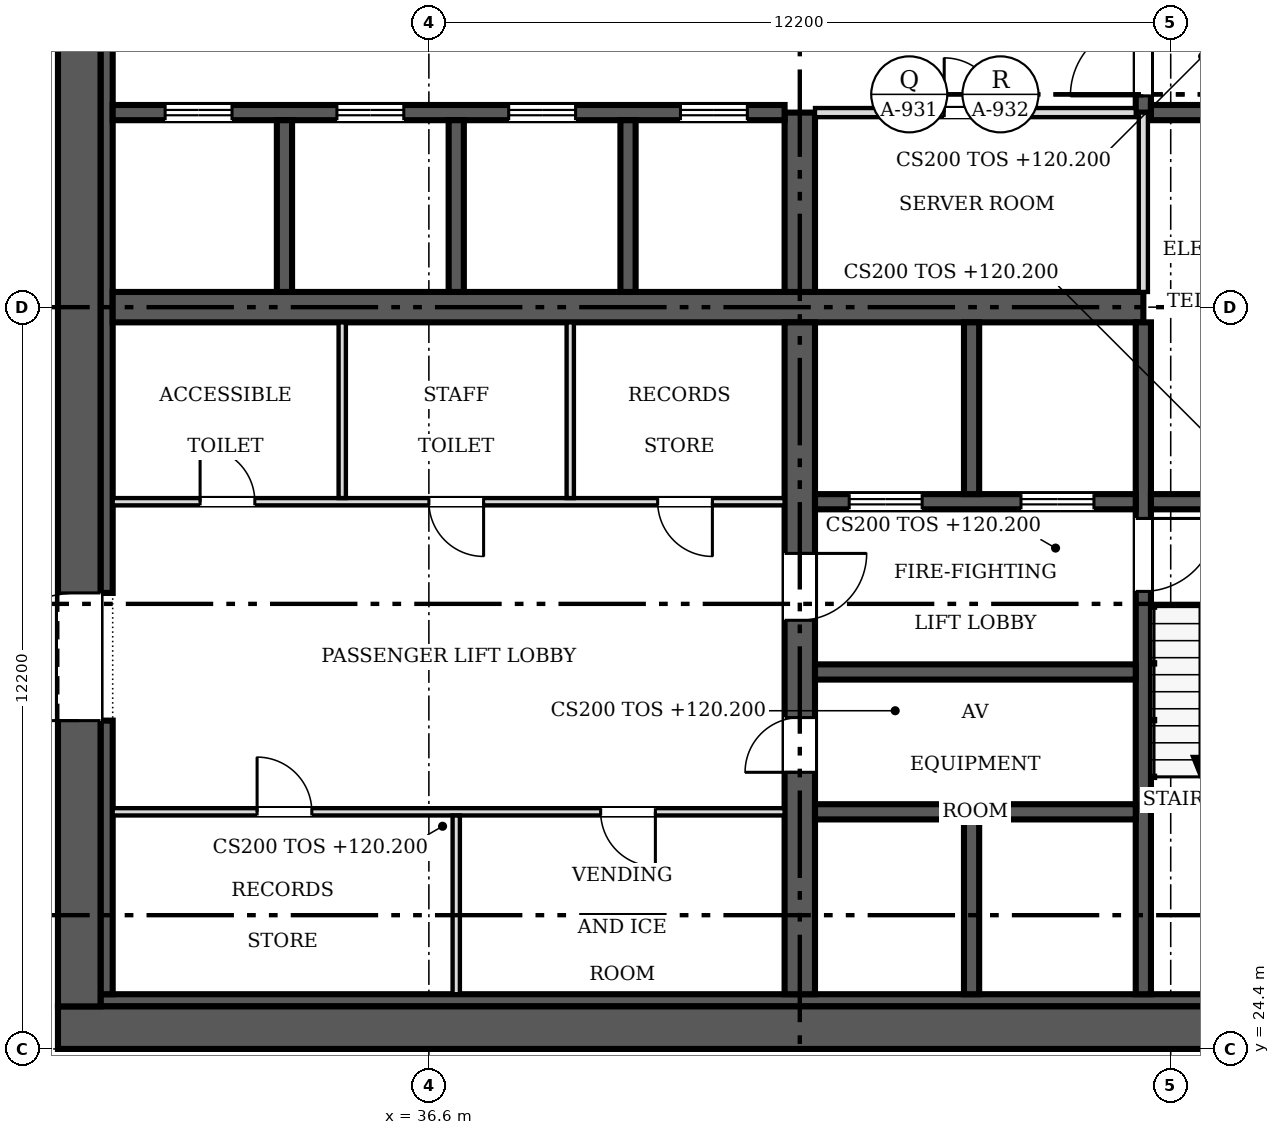
"""IFC4 building model, lengths in metres.
Left out: names, types, materials, properties, quantities, classifications, styles, units other than length and angle.
Written with IfcOpenShell. Run it as: python <this file> out.ifc"""

import sys

from ifc_helpers import new_model, si_unit, direction, frame, frame_2d, origin, place, context, subcontext, project, spatial, rectangle, extrude, source, transform, mapped, element, fill, save


model = new_model("IFC4")
c1 = context("Model", 3, precision=1e-05, world=origin(), true_north=direction((0.0, 1.0)))
c2 = subcontext(c1, "Body", "Model", "MODEL_VIEW")
j1 = project(units=[si_unit("LENGTHUNIT", "METRE"), si_unit("PLANEANGLEUNIT", "RADIAN")], contexts=[c1])
p1 = place(None, origin())
s1 = spatial("IfcSite", under=j1, at=p1, CompositionType="ELEMENT")
p2 = place(p1, origin())
s2 = spatial("IfcBuilding", under=s1, at=p2, CompositionType="ELEMENT")
p3 = place(p2, frame((0.0, 0.0, 120.2)))
s3 = spatial("IfcBuildingStorey", under=s2, at=p3, CompositionType="ELEMENT", Elevation=120.2)
p4 = place(p3, frame((54.9, 24.75, 0.0), z_axis=(0.0, 0.0, 1.0), x_axis=(-1.0, 0.0, 0.0)))
e1 = element("IfcWall", 1, at=p4, inside=s3, PredefinedType="SHEAR", context=c2, shape_type="SweptSolid", body=[
    extrude(rectangle(XDim=24.4, YDim=0.7, at=frame_2d((12.2, 0.0))), origin(), (0.0, 0.0, 1.0), 3.8),
])
m1 = source(origin(), c2, "Body", "SweptSolid", [
    extrude(rectangle(XDim=1.2, YDim=2.1, at=frame_2d((0.6, 1.05))), frame((0.0, 0.36, 0.0), z_axis=(0.0, -1.0, 0.0), x_axis=(1.0, 0.0, 0.0)), (0.0, 0.0, 1.0), 0.72),
])
p5 = place(p4, frame((1.5, 0.0, 0.0)))
e2 = element("IfcOpeningElement", 2, at=p5, cuts=e1, PredefinedType="OPENING", context=c2, shape_type="MappedRepresentation", body=[
    mapped(m1, transform((0.0, 0.0, 0.0), scale=1.0)),
])
p6 = place(p3, frame((30.85, 25.1, 0.0), z_axis=(0.0, 0.0, 1.0), x_axis=(0.0, 1.0, 0.0)))
e3 = element("IfcWall", 3, at=p6, inside=s3, PredefinedType="SHEAR", context=c2, shape_type="SweptSolid", body=[
    extrude(rectangle(XDim=23.0, YDim=0.7, at=frame_2d((11.5, 0.0))), origin(), (0.0, 0.0, 1.0), 3.8),
])
m2 = source(origin(), c2, "Body", "SweptSolid", [
    extrude(rectangle(XDim=2.1, YDim=2.4, at=frame_2d((1.05, 1.2))), frame((0.0, 0.36, 0.0), z_axis=(0.0, -1.0, 0.0), x_axis=(1.0, 0.0, 0.0)), (0.0, 0.0, 1.0), 0.72),
])
p7 = place(p6, frame((4.7, 0.0, 0.0)))
e4 = element("IfcOpeningElement", 4, at=p7, cuts=e3, PredefinedType="OPENING", context=c2, shape_type="MappedRepresentation", body=[
    mapped(m2, transform((0.0, 0.0, 0.0), scale=1.0)),
])
p8 = place(p6, frame((16.2, 0.0, 0.0)))
e5 = element("IfcOpeningElement", 5, at=p8, cuts=e3, PredefinedType="OPENING", context=c2, shape_type="MappedRepresentation", body=[
    mapped(m2, transform((0.0, 0.0, 0.0), scale=1.0)),
])
p9 = place(p3, frame((31.2, 25.2, 0.0), z_axis=(0.0, 0.0, 1.0), x_axis=(1.0, 0.0, 0.0)))
e6 = element("IfcWall", 6, at=p9, inside=s3, PredefinedType="SOLIDWALL", context=c2, shape_type="SweptSolid", body=[
    extrude(rectangle(XDim=21.0, YDim=0.2, at=frame_2d((10.5, 0.0))), origin(), (0.0, 0.0, 1.0), 3.8),
])
p10 = place(p3, frame((31.3, 25.3, 0.0), z_axis=(0.0, 0.0, 1.0), x_axis=(0.0, 1.0, 0.0)))
e7 = element("IfcWall", 7, at=p10, inside=s3, PredefinedType="SOLIDWALL", context=c2, shape_type="SweptSolid", body=[
    extrude(rectangle(XDim=4.5, YDim=0.2, at=frame_2d((2.25, 0.0))), origin(), (0.0, 0.0, 1.0), 3.8),
])
p11 = place(p3, frame((31.3, 31.9, 0.0), z_axis=(0.0, 0.0, 1.0), x_axis=(0.0, 1.0, 0.0)))
e8 = element("IfcWall", 8, at=p11, inside=s3, PredefinedType="SOLIDWALL", context=c2, shape_type="SweptSolid", body=[
    extrude(rectangle(XDim=9.4, YDim=0.2, at=frame_2d((4.7, 0.0))), origin(), (0.0, 0.0, 1.0), 3.8),
])
p12 = place(p3, frame((31.4, 36.6, 0.0), z_axis=(0.0, 0.0, 1.0), x_axis=(1.0, 0.0, 0.0)))
e9 = element("IfcWall", 9, at=p12, inside=s3, PredefinedType="SHEAR", context=c2, shape_type="SweptSolid", body=[
    extrude(rectangle(XDim=16.95, YDim=0.5, at=frame_2d((8.475, 0.0))), origin(), (0.0, 0.0, 1.0), 3.8),
])
p13 = place(p3, frame((42.7, 36.35, 0.0), z_axis=(0.0, 0.0, 1.0), x_axis=(0.0, -1.0, 0.0)))
e10 = element("IfcWall", 10, at=p13, inside=s3, PredefinedType="SHEAR", context=c2, shape_type="SweptSolid", body=[
    extrude(rectangle(XDim=11.05, YDim=0.5, at=frame_2d((5.525, 0.0))), origin(), (0.0, 0.0, 1.0), 3.8),
])
m3 = source(origin(), c2, "Body", "SweptSolid", [
    extrude(rectangle(XDim=0.9, YDim=2.1, at=frame_2d((0.45, 1.05))), frame((0.0, 0.26, 0.0), z_axis=(0.0, -1.0, 0.0), x_axis=(1.0, 0.0, 0.0)), (0.0, 0.0, 1.0), 0.52),
])
p14 = place(p13, frame((6.5, 0.0, 0.0)))
e11 = element("IfcOpeningElement", 11, at=p14, cuts=e10, PredefinedType="OPENING", context=c2, shape_type="MappedRepresentation", body=[
    mapped(m3, transform((0.0, 0.0, 0.0), scale=1.0)),
])
m4 = source(origin(), c2, "Body", "SweptSolid", [
    extrude(rectangle(XDim=1.1, YDim=2.1, at=frame_2d((0.55, 1.05))), frame((0.0, 0.26, 0.0), z_axis=(0.0, -1.0, 0.0), x_axis=(1.0, 0.0, 0.0)), (0.0, 0.0, 1.0), 0.52),
])
p15 = place(p13, frame((3.8, 0.0, 0.0)))
e12 = element("IfcOpeningElement", 12, at=p15, cuts=e10, PredefinedType="OPENING", context=c2, shape_type="MappedRepresentation", body=[
    mapped(m4, transform((0.0, 0.0, 0.0), scale=1.0)),
])
p16 = place(p3, frame((42.7, 36.85, 0.0), z_axis=(0.0, 0.0, 1.0), x_axis=(0.0, 1.0, 0.0)))
e13 = element("IfcWall", 13, at=p16, inside=s3, PredefinedType="SHEAR", context=c2, shape_type="SweptSolid", body=[
    extrude(rectangle(XDim=2.95, YDim=0.5, at=frame_2d((1.475, 0.0))), origin(), (0.0, 0.0, 1.0), 3.8),
])
p17 = place(p3, frame((31.4, 39.8, 0.0), z_axis=(0.0, 0.0, 1.0), x_axis=(1.0, 0.0, 0.0)))
e14 = element("IfcWall", 14, at=p17, inside=s3, PredefinedType="SOLIDWALL", context=c2, shape_type="SweptSolid", body=[
    extrude(rectangle(XDim=11.05, YDim=0.25, at=frame_2d((5.525, 0.0))), origin(), (0.0, 0.0, 1.0), 3.8),
])
m5 = source(origin(), c2, "Body", "SweptSolid", [
    extrude(rectangle(XDim=1.1, YDim=2.1, at=frame_2d((0.55, 1.05))), frame((0.0, 0.135, 0.0), z_axis=(0.0, -1.0, 0.0), x_axis=(1.0, 0.0, 0.0)), (0.0, 0.0, 1.0), 0.27),
])
p18 = place(p17, frame((0.863, 0.0, 0.0)))
e15 = element("IfcOpeningElement", 15, at=p18, cuts=e14, PredefinedType="OPENING", context=c2, shape_type="MappedRepresentation", body=[
    mapped(m5, transform((0.0, 0.0, 0.0), scale=1.0)),
])
p19 = place(p17, frame((3.688, 0.0, 0.0)))
e16 = element("IfcOpeningElement", 16, at=p19, cuts=e14, PredefinedType="OPENING", context=c2, shape_type="MappedRepresentation", body=[
    mapped(m5, transform((0.0, 0.0, 0.0), scale=1.0)),
])
p20 = place(p17, frame((6.512, 0.0, 0.0)))
e17 = element("IfcOpeningElement", 17, at=p20, cuts=e14, PredefinedType="OPENING", context=c2, shape_type="MappedRepresentation", body=[
    mapped(m5, transform((0.0, 0.0, 0.0), scale=1.0)),
])
p21 = place(p17, frame((9.337, 0.0, 0.0)))
e18 = element("IfcOpeningElement", 18, at=p21, cuts=e14, PredefinedType="OPENING", context=c2, shape_type="MappedRepresentation", body=[
    mapped(m5, transform((0.0, 0.0, 0.0), scale=1.0)),
])
p22 = place(p3, frame((48.35, 36.35, 0.0), z_axis=(0.0, 0.0, 1.0), x_axis=(0.0, -1.0, 0.0)))
e19 = element("IfcWall", 19, at=p22, inside=s3, PredefinedType="SOLIDWALL", context=c2, shape_type="SweptSolid", body=[
    extrude(rectangle(XDim=11.05, YDim=0.25, at=frame_2d((5.525, 0.0))), origin(), (0.0, 0.0, 1.0), 3.8),
])
m6 = source(origin(), c2, "Body", "SweptSolid", [
    extrude(rectangle(XDim=1.2, YDim=2.1, at=frame_2d((0.6, 1.05))), frame((0.0, 0.135, 0.0), z_axis=(0.0, -1.0, 0.0), x_axis=(1.0, 0.0, 0.0)), (0.0, 0.0, 1.0), 0.27),
])
p23 = place(p22, frame((3.225, 0.0, 0.0)))
e20 = element("IfcOpeningElement", 20, at=p23, cuts=e19, PredefinedType="OPENING", context=c2, shape_type="MappedRepresentation", body=[
    mapped(m6, transform((0.0, 0.0, 0.0), scale=1.0)),
])
p24 = place(p3, frame((48.225, 33.4, 0.0), z_axis=(0.0, 0.0, 1.0), x_axis=(-1.0, 0.0, 0.0)))
e21 = element("IfcWall", 21, at=p24, inside=s3, PredefinedType="SOLIDWALL", context=c2, shape_type="SweptSolid", body=[
    extrude(rectangle(XDim=5.275, YDim=0.25, at=frame_2d((2.638, 0.0))), origin(), (0.0, 0.0, 1.0), 3.8),
])
p25 = place(p24, frame((3.512, 0.0, 0.0)))
e22 = element("IfcOpeningElement", 22, at=p25, cuts=e21, PredefinedType="OPENING", context=c2, shape_type="MappedRepresentation", body=[
    mapped(m6, transform((0.0, 0.0, 0.0), scale=1.0)),
])
p26 = place(p24, frame((0.688, 0.0, 0.0)))
e23 = element("IfcOpeningElement", 23, at=p26, cuts=e21, PredefinedType="OPENING", context=c2, shape_type="MappedRepresentation", body=[
    mapped(m6, transform((0.0, 0.0, 0.0), scale=1.0)),
])
p27 = place(p3, frame((48.475, 33.4, 0.0), z_axis=(0.0, 0.0, 1.0), x_axis=(1.0, 0.0, 0.0)))
e24 = element("IfcWall", 24, at=p27, inside=s3, PredefinedType="SOLIDWALL", context=c2, shape_type="SweptSolid", body=[
    extrude(rectangle(XDim=3.525, YDim=0.25, at=frame_2d((1.762, 0.0))), origin(), (0.0, 0.0, 1.0), 3.8),
])
p28 = place(p3, frame((48.35, 47.9, 0.0), z_axis=(0.0, 0.0, 1.0), x_axis=(0.0, -1.0, 0.0)))
e25 = element("IfcWall", 25, at=p28, inside=s3, PredefinedType="SOLIDWALL", context=c2, shape_type="SweptSolid", body=[
    extrude(rectangle(XDim=8.1, YDim=0.25, at=frame_2d((4.05, 0.0))), origin(), (0.0, 0.0, 1.0), 3.8),
])
p29 = place(p28, frame((6.625, 0.0, 0.0)))
e26 = element("IfcOpeningElement", 26, at=p29, cuts=e25, PredefinedType="OPENING", context=c2, shape_type="MappedRepresentation", body=[
    mapped(m6, transform((0.0, 0.0, 0.0), scale=1.0)),
])
for number, where, z_axis, x_axis in (
    (27, (42.95, 28.3, 0.0), (0.0, 0.0, 1.0), (1.0, 0.0, 0.0)),
    (28, (42.95, 30.6, 0.0), (0.0, 0.0, 1.0), (1.0, 0.0, 0.0)),
):
    element("IfcWall", number, at=place(p3, frame(where, z_axis=z_axis, x_axis=x_axis)), inside=s3, PredefinedType="SOLIDWALL", context=c2, shape_type="SweptSolid", body=[
        extrude(rectangle(XDim=5.275, YDim=0.25, at=frame_2d((2.638, 0.0))), origin(), (0.0, 0.0, 1.0), 3.8),
    ])
p30 = place(p3, frame((48.475, 39.8, 0.0), z_axis=(0.0, 0.0, 1.0), x_axis=(1.0, 0.0, 0.0)))
e29 = element("IfcWall", 29, at=p30, inside=s3, PredefinedType="SOLIDWALL", context=c2, shape_type="SweptSolid", body=[
    extrude(rectangle(XDim=3.4, YDim=0.25, at=frame_2d((1.7, 0.0))), origin(), (0.0, 0.0, 1.0), 3.8),
])
for number, where, z_axis, x_axis in (
    (30, (34.225, 36.85, 0.0), (0.0, 0.0, 1.0), (0.0, 1.0, 0.0)),
    (31, (37.05, 36.85, 0.0), (0.0, 0.0, 1.0), (0.0, 1.0, 0.0)),
    (32, (39.875, 36.85, 0.0), (0.0, 0.0, 1.0), (0.0, 1.0, 0.0)),
):
    element("IfcWall", number, at=place(p3, frame(where, z_axis=z_axis, x_axis=x_axis)), inside=s3, PredefinedType="SOLIDWALL", context=c2, shape_type="SweptSolid", body=[
        extrude(rectangle(XDim=2.825, YDim=0.25, at=frame_2d((1.413, 0.0))), origin(), (0.0, 0.0, 1.0), 3.8),
    ])
p31 = place(p3, frame((45.525, 33.525, 0.0), z_axis=(0.0, 0.0, 1.0), x_axis=(0.0, 1.0, 0.0)))
e33 = element("IfcWall", 33, at=p31, inside=s3, PredefinedType="SOLIDWALL", context=c2, shape_type="SweptSolid", body=[
    extrude(rectangle(XDim=2.825, YDim=0.25, at=frame_2d((1.413, 0.0))), origin(), (0.0, 0.0, 1.0), 3.8),
])
p32 = place(p3, frame((45.525, 25.3, 0.0), z_axis=(0.0, 0.0, 1.0), x_axis=(0.0, 1.0, 0.0)))
e34 = element("IfcWall", 34, at=p32, inside=s3, PredefinedType="SOLIDWALL", context=c2, shape_type="SweptSolid", body=[
    extrude(rectangle(XDim=2.875, YDim=0.25, at=frame_2d((1.438, 0.0))), origin(), (0.0, 0.0, 1.0), 3.8),
])
p33 = place(p3, frame((42.45, 28.3, 0.0), z_axis=(0.0, 0.0, 1.0), x_axis=(-1.0, 0.0, 0.0)))
e35 = element("IfcWall", 35, at=p33, inside=s3, PredefinedType="PARTITIONING", context=c2, shape_type="SweptSolid", body=[
    extrude(rectangle(XDim=11.05, YDim=0.12, at=frame_2d((5.525, 0.0))), origin(), (0.0, 0.0, 1.0), 3.6),
])
m7 = source(origin(), c2, "Body", "SweptSolid", [
    extrude(rectangle(XDim=0.9, YDim=2.1, at=frame_2d((0.45, 1.05))), frame((0.0, 0.07, 0.0), z_axis=(0.0, -1.0, 0.0), x_axis=(1.0, 0.0, 0.0)), (0.0, 0.0, 1.0), 0.14),
])
p34 = place(p33, frame((7.775, 0.0, 0.0)))
e36 = element("IfcOpeningElement", 36, at=p34, cuts=e35, PredefinedType="OPENING", context=c2, shape_type="MappedRepresentation", body=[
    mapped(m7, transform((0.0, 0.0, 0.0), scale=1.0)),
])
p35 = place(p33, frame((2.125, 0.0, 0.0)))
e37 = element("IfcOpeningElement", 37, at=p35, cuts=e35, PredefinedType="OPENING", context=c2, shape_type="MappedRepresentation", body=[
    mapped(m7, transform((0.0, 0.0, 0.0), scale=1.0)),
])
p36 = place(p3, frame((31.4, 33.4, 0.0), z_axis=(0.0, 0.0, 1.0), x_axis=(1.0, 0.0, 0.0)))
e38 = element("IfcWall", 38, at=p36, inside=s3, PredefinedType="PARTITIONING", context=c2, shape_type="SweptSolid", body=[
    extrude(rectangle(XDim=11.05, YDim=0.12, at=frame_2d((5.525, 0.0))), origin(), (0.0, 0.0, 1.0), 3.6),
])
p37 = place(p36, frame((1.438, 0.0, 0.0)))
e39 = element("IfcOpeningElement", 39, at=p37, cuts=e38, PredefinedType="OPENING", context=c2, shape_type="MappedRepresentation", body=[
    mapped(m7, transform((0.0, 0.0, 0.0), scale=1.0)),
])
p38 = place(p36, frame((5.2, 0.0, 0.0)))
e40 = element("IfcOpeningElement", 40, at=p38, cuts=e38, PredefinedType="OPENING", context=c2, shape_type="MappedRepresentation", body=[
    mapped(m7, transform((0.0, 0.0, 0.0), scale=1.0)),
])
p39 = place(p36, frame((8.962, 0.0, 0.0)))
e41 = element("IfcOpeningElement", 41, at=p39, cuts=e38, PredefinedType="OPENING", context=c2, shape_type="MappedRepresentation", body=[
    mapped(m7, transform((0.0, 0.0, 0.0), scale=1.0)),
])
p40 = place(p3, frame((48.225, 39.8, 0.0), z_axis=(0.0, 0.0, 1.0), x_axis=(-1.0, 0.0, 0.0)))
e42 = element("IfcWall", 42, at=p40, inside=s3, PredefinedType="PARTITIONING", context=c2, shape_type="SweptSolid", body=[
    extrude(rectangle(XDim=5.275, YDim=0.15, at=frame_2d((2.638, 0.0))), origin(), (0.0, 0.0, 1.0), 3.6),
])
m8 = source(origin(), c2, "Body", "SweptSolid", [
    extrude(rectangle(XDim=0.9, YDim=2.1, at=frame_2d((0.45, 1.05))), frame((0.0, 0.085, 0.0), z_axis=(0.0, -1.0, 0.0), x_axis=(1.0, 0.0, 0.0)), (0.0, 0.0, 1.0), 0.17),
])
p41 = place(p40, frame((2.25, 0.0, 0.0)))
e43 = element("IfcOpeningElement", 43, at=p41, cuts=e42, PredefinedType="OPENING", context=c2, shape_type="MappedRepresentation", body=[
    mapped(m8, transform((0.0, 0.0, 0.0), scale=1.0)),
])
p42 = place(p3, frame((48.35, 36.85, 0.0), z_axis=(0.0, 0.0, 1.0), x_axis=(0.0, 1.0, 0.0)))
e44 = element("IfcWall", 44, at=p42, inside=s3, PredefinedType="PARTITIONING", context=c2, shape_type="SweptSolid", body=[
    extrude(rectangle(XDim=2.95, YDim=0.15, at=frame_2d((1.475, 0.0))), origin(), (0.0, 0.0, 1.0), 3.6),
])
for number, where, z_axis, x_axis in (
    (45, (35.175, 33.46, 0.0), (0.0, 0.0, 1.0), (0.0, 1.0, 0.0)),
    (46, (38.925, 33.46, 0.0), (0.0, 0.0, 1.0), (0.0, 1.0, 0.0)),
):
    element("IfcWall", number, at=place(p3, frame(where, z_axis=z_axis, x_axis=x_axis)), inside=s3, PredefinedType="PARTITIONING", context=c2, shape_type="SweptSolid", body=[
        extrude(rectangle(XDim=2.89, YDim=0.12, at=frame_2d((1.445, 0.0))), origin(), (0.0, 0.0, 1.0), 3.6),
    ])
p43 = place(p3, frame((37.05, 25.3, 0.0), z_axis=(0.0, 0.0, 1.0), x_axis=(0.0, 1.0, 0.0)))
e47 = element("IfcWall", 47, at=p43, inside=s3, PredefinedType="PARTITIONING", context=c2, shape_type="SweptSolid", body=[
    extrude(rectangle(XDim=2.94, YDim=0.12, at=frame_2d((1.47, 0.0))), origin(), (0.0, 0.0, 1.0), 3.6),
])
m9 = source(origin(), c2, "Body", "SweptSolid", [
    extrude(rectangle(XDim=2.1, YDim=2.4, at=frame_2d((1.05, 1.2))), frame((0.0, 0.025, 0.0), z_axis=(0.0, -1.0, 0.0), x_axis=(1.0, 0.0, 0.0)), (0.0, 0.0, 1.0), 0.05),
])
p44 = place(p7, origin())
e48 = element("IfcDoor", 48, at=p44, inside=s3, OperationType="DOUBLE_DOOR_SINGLE_SWING", PredefinedType="DOOR", context=c2, shape_type="MappedRepresentation", body=[
    mapped(m9, transform((0.0, 0.0, 0.0), scale=1.0)),
])
fill(e4, e48)
m10 = source(origin(), c2, "Body", "SweptSolid", [
    extrude(rectangle(XDim=0.9, YDim=2.1, at=frame_2d((0.45, 1.05))), frame((0.0, 0.025, 0.0), z_axis=(0.0, -1.0, 0.0), x_axis=(1.0, 0.0, 0.0)), (0.0, 0.0, 1.0), 0.05),
])
p45 = place(p14, origin())
e49 = element("IfcDoor", 49, at=p45, inside=s3, OperationType="SINGLE_SWING_RIGHT", PredefinedType="DOOR", context=c2, shape_type="MappedRepresentation", body=[
    mapped(m10, transform((0.0, 0.0, 0.0), scale=1.0)),
])
fill(e11, e49)
m11 = source(origin(), c2, "Body", "SweptSolid", [
    extrude(rectangle(XDim=1.1, YDim=2.1, at=frame_2d((0.55, 1.05))), frame((0.0, 0.025, 0.0), z_axis=(0.0, -1.0, 0.0), x_axis=(1.0, 0.0, 0.0)), (0.0, 0.0, 1.0), 0.05),
])
p46 = place(p15, origin())
e50 = element("IfcDoor", 50, at=p46, inside=s3, OperationType="SINGLE_SWING_LEFT", PredefinedType="DOOR", context=c2, shape_type="MappedRepresentation", body=[
    mapped(m11, transform((0.0, 0.0, 0.0), scale=1.0)),
])
fill(e12, e50)
p47 = place(p18, origin())
e51 = element("IfcDoor", 51, at=p47, inside=s3, OperationType="DOUBLE_DOOR_SLIDING", PredefinedType="DOOR", context=c2, shape_type="MappedRepresentation", body=[
    mapped(m11, transform((0.0, 0.0, 0.0), scale=1.0)),
])
fill(e15, e51)
p48 = place(p19, origin())
e52 = element("IfcDoor", 52, at=p48, inside=s3, OperationType="DOUBLE_DOOR_SLIDING", PredefinedType="DOOR", context=c2, shape_type="MappedRepresentation", body=[
    mapped(m11, transform((0.0, 0.0, 0.0), scale=1.0)),
])
fill(e16, e52)
p49 = place(p20, origin())
e53 = element("IfcDoor", 53, at=p49, inside=s3, OperationType="DOUBLE_DOOR_SLIDING", PredefinedType="DOOR", context=c2, shape_type="MappedRepresentation", body=[
    mapped(m11, transform((0.0, 0.0, 0.0), scale=1.0)),
])
fill(e17, e53)
p50 = place(p21, origin())
e54 = element("IfcDoor", 54, at=p50, inside=s3, OperationType="DOUBLE_DOOR_SLIDING", PredefinedType="DOOR", context=c2, shape_type="MappedRepresentation", body=[
    mapped(m11, transform((0.0, 0.0, 0.0), scale=1.0)),
])
fill(e18, e54)
m12 = source(origin(), c2, "Body", "SweptSolid", [
    extrude(rectangle(XDim=1.2, YDim=2.1, at=frame_2d((0.6, 1.05))), frame((0.0, 0.025, 0.0), z_axis=(0.0, -1.0, 0.0), x_axis=(1.0, 0.0, 0.0)), (0.0, 0.0, 1.0), 0.05),
])
p51 = place(p23, origin())
e55 = element("IfcDoor", 55, at=p51, inside=s3, OperationType="SINGLE_SWING_LEFT", PredefinedType="DOOR", context=c2, shape_type="MappedRepresentation", body=[
    mapped(m12, transform((0.0, 0.0, 0.0), scale=1.0)),
])
fill(e20, e55)
p52 = place(p25, origin())
e56 = element("IfcDoor", 56, at=p52, inside=s3, OperationType="DOUBLE_DOOR_SLIDING", PredefinedType="DOOR", context=c2, shape_type="MappedRepresentation", body=[
    mapped(m12, transform((0.0, 0.0, 0.0), scale=1.0)),
])
fill(e22, e56)
p53 = place(p26, origin())
e57 = element("IfcDoor", 57, at=p53, inside=s3, OperationType="DOUBLE_DOOR_SLIDING", PredefinedType="DOOR", context=c2, shape_type="MappedRepresentation", body=[
    mapped(m12, transform((0.0, 0.0, 0.0), scale=1.0)),
])
fill(e23, e57)
p54 = place(p29, origin())
e58 = element("IfcDoor", 58, at=p54, inside=s3, OperationType="SINGLE_SWING_RIGHT", PredefinedType="DOOR", context=c2, shape_type="MappedRepresentation", body=[
    mapped(m12, transform((0.0, 0.0, 0.0), scale=1.0)),
])
fill(e26, e58)
p55 = place(p34, origin())
e59 = element("IfcDoor", 59, at=p55, inside=s3, OperationType="SINGLE_SWING_RIGHT", PredefinedType="DOOR", context=c2, shape_type="MappedRepresentation", body=[
    mapped(m10, transform((0.0, 0.0, 0.0), scale=1.0)),
])
fill(e36, e59)
p56 = place(p35, origin())
e60 = element("IfcDoor", 60, at=p56, inside=s3, OperationType="SINGLE_SWING_LEFT", PredefinedType="DOOR", context=c2, shape_type="MappedRepresentation", body=[
    mapped(m10, transform((0.0, 0.0, 0.0), scale=1.0)),
])
fill(e37, e60)
p57 = place(p37, origin())
e61 = element("IfcDoor", 61, at=p57, inside=s3, OperationType="SINGLE_SWING_LEFT", PredefinedType="DOOR", context=c2, shape_type="MappedRepresentation", body=[
    mapped(m10, transform((0.0, 0.0, 0.0), scale=1.0)),
])
fill(e39, e61)
p58 = place(p38, origin())
e62 = element("IfcDoor", 62, at=p58, inside=s3, OperationType="SINGLE_SWING_RIGHT", PredefinedType="DOOR", context=c2, shape_type="MappedRepresentation", body=[
    mapped(m10, transform((0.0, 0.0, 0.0), scale=1.0)),
])
fill(e40, e62)
p59 = place(p39, origin())
e63 = element("IfcDoor", 63, at=p59, inside=s3, OperationType="SINGLE_SWING_RIGHT", PredefinedType="DOOR", context=c2, shape_type="MappedRepresentation", body=[
    mapped(m10, transform((0.0, 0.0, 0.0), scale=1.0)),
])
fill(e41, e63)
p60 = place(p41, origin())
e64 = element("IfcDoor", 64, at=p60, inside=s3, OperationType="SINGLE_SWING_RIGHT", PredefinedType="DOOR", context=c2, shape_type="MappedRepresentation", body=[
    mapped(m10, transform((0.0, 0.0, 0.0), scale=1.0)),
])
fill(e43, e64)
save(model, sys.argv[1])
